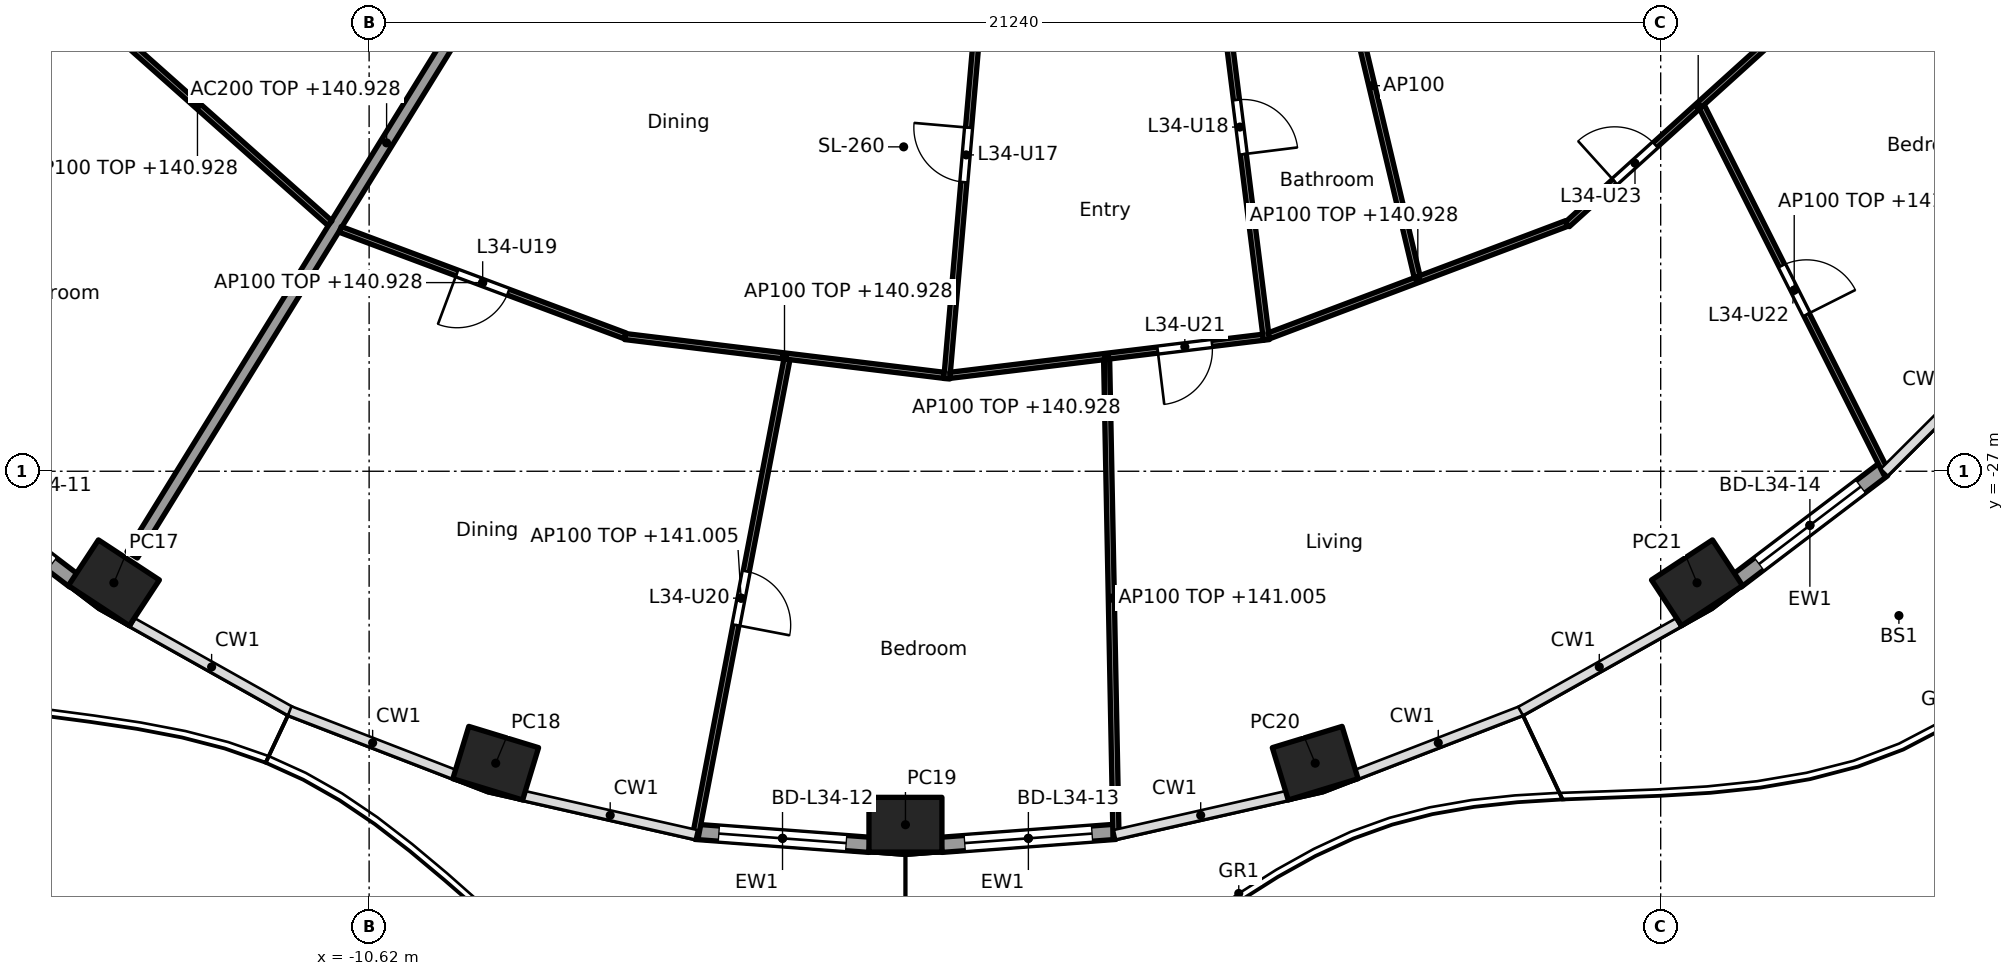
"""IFC4 building model, lengths in metres.
Left out: names, types, materials, properties, quantities, classifications, styles, units other than length and angle.
Written with IfcOpenShell. Run it as: python <this file> out.ifc"""

import sys

from ifc_helpers import new_model, si_unit, direction, frame, frame_2d, origin, origin_2d, place, context, subcontext, project, spatial, rectangle, hollow_rectangle, extrude, element, fill, save


model = new_model("IFC4")
c1 = context("Model", 3, precision=1e-05, world=origin(), true_north=direction((0.0, 1.0)))
c2 = subcontext(c1, "Body", "Model", "MODEL_VIEW")
j1 = project(units=[si_unit("LENGTHUNIT", "METRE"), si_unit("PLANEANGLEUNIT", "RADIAN")], contexts=[c1])
p1 = place(None, origin())
s1 = spatial("IfcSite", under=j1, at=p1, CompositionType="ELEMENT")
p2 = place(p1, origin())
s2 = spatial("IfcBuilding", under=s1, at=p2, CompositionType="ELEMENT")
p3 = place(p2, frame((0.0, 0.0, 138.1)))
s3 = spatial("IfcBuildingStorey", under=s2, at=p3, CompositionType="ELEMENT", Elevation=138.1)
for number, where, z_axis, x_axis in (
    (1, (-14.817, -28.834, 0.0), (0.0, 0.0, 1.0), (0.836, -0.549, 0.0)),
    (2, (-8.538, -31.801, 0.0), (0.0, 0.0, 1.0), (0.957, -0.292, 0.0)),
    (3, (-1.8, -32.813, 0.0), (0.0, 0.0, 1.0), (1.0, 0.0, 0.0)),
    (4, (4.938, -31.801, 0.0), (0.0, 0.0, 1.0), (0.957, 0.292, 0.0)),
    (5, (11.218, -28.834, 0.0), (0.0, 0.0, 1.0), (0.836, 0.549, 0.0)),
):
    element("IfcColumn", number, at=place(p3, frame(where, z_axis=z_axis, x_axis=x_axis)), inside=s3, PredefinedType="COLUMN", context=c2, shape_type="SweptSolid", body=[
        extrude(hollow_rectangle(XDim=1.2, YDim=0.9, WallThickness=0.04, at=origin_2d()), origin(), (0.0, 0.0, 1.0), 3.7),
    ])
p4 = place(p3, frame((-15.469, -28.805, 0.0), z_axis=(0.0, 0.0, 1.0), x_axis=(-0.796022231079, 0.605267385233, 0.0)))
e6 = element("IfcWall", 6, at=p4, inside=s3, PredefinedType="SOLIDWALL", context=c2, shape_type="SweptSolid", body=[
    extrude(rectangle(XDim=3.026, YDim=0.25, at=frame_2d((1.513, 0.0))), origin(), (0.0, 0.0, 1.0), 3.44),
])
p5 = place(p4, frame((0.463, 0.0, 0.0)))
e7 = element("IfcOpeningElement", 7, at=p5, cuts=e6, PredefinedType="OPENING", context=c2, shape_type="SweptSolid", body=[
    extrude(rectangle(XDim=2.1, YDim=2.4, at=frame_2d((1.05, 1.2))), frame((0.0, 0.135, 0.0), z_axis=(0.0, -1.0, 0.0), x_axis=(1.0, 0.0, 0.0)), (0.0, 0.0, 1.0), 0.27),
])
p6 = place(p3, frame((-2.389, -33.143, 0.0), z_axis=(0.0, 0.0, 1.0), x_axis=(-0.997231697044, 0.074356858535, 0.0)))
e8 = element("IfcWall", 8, at=p6, inside=s3, PredefinedType="SOLIDWALL", context=c2, shape_type="SweptSolid", body=[
    extrude(rectangle(XDim=2.873, YDim=0.25, at=frame_2d((1.437, 0.0))), origin(), (0.0, 0.0, 1.0), 3.44),
])
p7 = place(p6, frame((0.386, 0.0, 0.0)))
e9 = element("IfcOpeningElement", 9, at=p7, cuts=e8, PredefinedType="OPENING", context=c2, shape_type="SweptSolid", body=[
    extrude(rectangle(XDim=2.1, YDim=2.4, at=frame_2d((1.05, 1.2))), frame((0.0, 0.135, 0.0), z_axis=(0.0, -1.0, 0.0), x_axis=(1.0, 0.0, 0.0)), (0.0, 0.0, 1.0), 0.27),
])
p8 = place(p3, frame((1.654, -32.93, 0.0), z_axis=(0.0, 0.0, 1.0), x_axis=(-0.997232166829, -0.074350557769, 0.0)))
e10 = element("IfcWall", 10, at=p8, inside=s3, PredefinedType="SOLIDWALL", context=c2, shape_type="SweptSolid", body=[
    extrude(rectangle(XDim=2.873, YDim=0.25, at=frame_2d((1.437, 0.0))), origin(), (0.0, 0.0, 1.0), 3.44),
])
p9 = place(p8, frame((0.386, 0.0, 0.0)))
e11 = element("IfcOpeningElement", 11, at=p9, cuts=e10, PredefinedType="OPENING", context=c2, shape_type="SweptSolid", body=[
    extrude(rectangle(XDim=2.1, YDim=2.4, at=frame_2d((1.05, 1.2))), frame((0.0, 0.135, 0.0), z_axis=(0.0, -1.0, 0.0), x_axis=(1.0, 0.0, 0.0)), (0.0, 0.0, 1.0), 0.27),
])
p10 = place(p3, frame((14.278, -26.973, 0.0), z_axis=(0.0, 0.0, 1.0), x_axis=(-0.796022231079, -0.605267385233, 0.0)))
e12 = element("IfcWall", 12, at=p10, inside=s3, PredefinedType="SOLIDWALL", context=c2, shape_type="SweptSolid", body=[
    extrude(rectangle(XDim=3.026, YDim=0.25, at=frame_2d((1.513, 0.0))), origin(), (0.0, 0.0, 1.0), 3.44),
])
p11 = place(p10, frame((0.463, 0.0, 0.0)))
e13 = element("IfcOpeningElement", 13, at=p11, cuts=e12, PredefinedType="OPENING", context=c2, shape_type="SweptSolid", body=[
    extrude(rectangle(XDim=2.1, YDim=2.4, at=frame_2d((1.05, 1.2))), frame((0.0, 0.135, 0.0), z_axis=(0.0, -1.0, 0.0), x_axis=(1.0, 0.0, 0.0)), (0.0, 0.0, 1.0), 0.27),
])
p12 = place(p3, frame((-6.149, -14.825, 0.0), z_axis=(0.0, 0.0, 1.0), x_axis=(-0.525406383516, -0.85085141603, 0.0)))
e14 = element("IfcWall", 14, at=p12, inside=s3, PredefinedType="PARTITIONING", context=c2, shape_type="SweptSolid", body=[
    extrude(rectangle(XDim=15.925, YDim=0.2, at=frame_2d((7.962, 0.0))), origin(), (0.0, 0.0, 1.0), 2.828),
])
p13 = place(p3, frame((-11.109, -13.951, 0.0), z_axis=(0.0, 0.0, 1.0), x_axis=(-0.668488676691, -0.743722319913, 0.0)))
e15 = element("IfcWall", 15, at=p13, inside=s3, PredefinedType="PARTITIONING", context=c2, shape_type="SweptSolid", body=[
    extrude(rectangle(XDim=13.094, YDim=0.1, at=frame_2d((6.547, 0.0))), origin(), (0.0, 0.0, 1.0), 2.828),
])
p14 = place(p13, frame((9.5, 0.0, 0.0)))
e16 = element("IfcOpeningElement", 16, at=p14, cuts=e15, PredefinedType="OPENING", context=c2, shape_type="SweptSolid", body=[
    extrude(rectangle(XDim=0.9, YDim=2.1, at=frame_2d((0.45, 1.05))), frame((0.0, 0.06, 0.0), z_axis=(0.0, -1.0, 0.0), x_axis=(1.0, 0.0, 0.0)), (0.0, 0.0, 1.0), 0.12),
])
p15 = place(p3, frame((-15.622, -19.046, 0.0), z_axis=(0.0, 0.0, 1.0), x_axis=(0.747342322463, -0.664439201925, 0.0)))
e17 = element("IfcWall", 17, at=p15, inside=s3, PredefinedType="PARTITIONING", context=c2, shape_type="SweptSolid", body=[
    extrude(rectangle(XDim=5.831, YDim=0.1, at=frame_2d((2.916, 0.0))), origin(), (0.0, 0.0, 1.0), 2.828),
])
p16 = place(p3, frame((-11.096, -23.022, 0.0), z_axis=(0.0, 0.0, 1.0), x_axis=(0.936725688471, -0.350064257758, 0.0)))
e18 = element("IfcWall", 18, at=p16, inside=s3, PredefinedType="PARTITIONING", context=c2, shape_type="SweptSolid", body=[
    extrude(rectangle(XDim=5.003, YDim=0.1, at=frame_2d((2.501, 0.0))), origin(), (0.0, 0.0, 1.0), 2.828),
])
p17 = place(p16, frame((2.051, 0.0, 0.0)))
e19 = element("IfcOpeningElement", 19, at=p17, cuts=e18, PredefinedType="OPENING", context=c2, shape_type="SweptSolid", body=[
    extrude(rectangle(XDim=0.9, YDim=2.1, at=frame_2d((0.45, 1.05))), frame((0.0, 0.06, 0.0), z_axis=(0.0, -1.0, 0.0), x_axis=(1.0, 0.0, 0.0)), (0.0, 0.0, 1.0), 0.12),
])
p18 = place(p3, frame((-6.413, -24.784, 0.0), z_axis=(0.0, 0.0, 1.0), x_axis=(0.992690077723, -0.120691381588, 0.0)))
e20 = element("IfcWall", 20, at=p18, inside=s3, PredefinedType="PARTITIONING", context=c2, shape_type="SweptSolid", body=[
    extrude(rectangle(XDim=5.286, YDim=0.1, at=frame_2d((2.643, 0.0))), origin(), (0.0, 0.0, 1.0), 2.828),
])
p19 = place(p3, frame((-3.749, -25.159, 0.0), z_axis=(0.0, 0.0, 1.0), x_axis=(-0.188392334675, -0.982093848996, 0.0)))
e21 = element("IfcWall", 21, at=p19, inside=s3, PredefinedType="PARTITIONING", context=c2, shape_type="SweptSolid", body=[
    extrude(rectangle(XDim=8.0, YDim=0.1, at=frame_2d((4.0, 0.0))), origin(), (0.0, 0.0, 1.0), 2.905),
])
p20 = place(p19, frame((3.55, 0.0, 0.0)))
e22 = element("IfcOpeningElement", 22, at=p20, cuts=e21, PredefinedType="OPENING", context=c2, shape_type="SweptSolid", body=[
    extrude(rectangle(XDim=0.9, YDim=2.1, at=frame_2d((0.45, 1.05))), frame((0.0, 0.06, 0.0), z_axis=(0.0, -1.0, 0.0), x_axis=(1.0, 0.0, 0.0)), (0.0, 0.0, 1.0), 0.12),
])
p21 = place(p3, frame((-0.009, -12.664, 0.0), z_axis=(0.0, 0.0, 1.0), x_axis=(-0.086441225464, -0.996256952066, 0.0)))
e23 = element("IfcWall", 23, at=p21, inside=s3, PredefinedType="PARTITIONING", context=c2, shape_type="SweptSolid", body=[
    extrude(rectangle(XDim=12.862, YDim=0.1, at=frame_2d((6.431, 0.0))), origin(), (0.0, 0.0, 1.0), 2.756),
])
p22 = place(p21, frame((2.312, 0.0, 0.0)))
e24 = element("IfcOpeningElement", 24, at=p22, cuts=e23, PredefinedType="OPENING", context=c2, shape_type="SweptSolid", body=[
    extrude(rectangle(XDim=0.9, YDim=2.1, at=frame_2d((0.45, 1.05))), frame((0.0, 0.06, 0.0), z_axis=(0.0, -1.0, 0.0), x_axis=(1.0, 0.0, 0.0)), (0.0, 0.0, 1.0), 0.12),
])
p23 = place(p21, frame((8.718, 0.0, 0.0)))
e25 = element("IfcOpeningElement", 25, at=p23, cuts=e23, PredefinedType="OPENING", context=c2, shape_type="SweptSolid", body=[
    extrude(rectangle(XDim=0.9, YDim=2.1, at=frame_2d((0.45, 1.05))), frame((0.0, 0.06, 0.0), z_axis=(0.0, -1.0, 0.0), x_axis=(1.0, 0.0, 0.0)), (0.0, 0.0, 1.0), 0.12),
])
p24 = place(p3, frame((-1.066, -25.422, 0.0), z_axis=(0.0, 0.0, 1.0), x_axis=(0.992692993044, 0.120667400577, 0.0)))
e26 = element("IfcWall", 26, at=p24, inside=s3, PredefinedType="PARTITIONING", context=c2, shape_type="SweptSolid", body=[
    extrude(rectangle(XDim=5.186, YDim=0.1, at=frame_2d((2.593, 0.0))), origin(), (0.0, 0.0, 1.0), 2.828),
])
p25 = place(p24, frame((3.439, 0.0, 0.0)))
e27 = element("IfcOpeningElement", 27, at=p25, cuts=e26, PredefinedType="OPENING", context=c2, shape_type="SweptSolid", body=[
    extrude(rectangle(XDim=0.9, YDim=2.1, at=frame_2d((0.45, 1.05))), frame((0.0, 0.06, 0.0), z_axis=(0.0, -1.0, 0.0), x_axis=(1.0, 0.0, 0.0)), (0.0, 0.0, 1.0), 0.12),
])
p26 = place(p3, frame((1.508, -25.159, 0.0), z_axis=(0.0, 0.0, 1.0), x_axis=(0.019670464527, -0.999806517695, 0.0)))
e28 = element("IfcWall", 28, at=p26, inside=s3, PredefinedType="PARTITIONING", context=c2, shape_type="SweptSolid", body=[
    extrude(rectangle(XDim=7.856, YDim=0.1, at=frame_2d((3.928, 0.0))), origin(), (0.0, 0.0, 1.0), 2.905),
])
p27 = place(p3, frame((2.615, -12.664, 0.0), z_axis=(0.0, 0.0, 1.0), x_axis=(0.124051875784, -0.992275733914, 0.0)))
e29 = element("IfcWall", 29, at=p27, inside=s3, PredefinedType="PARTITIONING", context=c2, shape_type="SweptSolid", body=[
    extrude(rectangle(XDim=12.271, YDim=0.1, at=frame_2d((6.135, 0.0))), origin(), (0.0, 0.0, 1.0), 2.756),
])
p28 = place(p27, frame((2.183, 0.0, 0.0)))
e30 = element("IfcOpeningElement", 30, at=p28, cuts=e29, PredefinedType="OPENING", context=c2, shape_type="SweptSolid", body=[
    extrude(rectangle(XDim=0.9, YDim=2.1, at=frame_2d((0.45, 1.05))), frame((0.0, 0.06, 0.0), z_axis=(0.0, -1.0, 0.0), x_axis=(1.0, 0.0, 0.0)), (0.0, 0.0, 1.0), 0.12),
])
p29 = place(p27, frame((8.293, 0.0, 0.0)))
e31 = element("IfcOpeningElement", 31, at=p29, cuts=e29, PredefinedType="OPENING", context=c2, shape_type="SweptSolid", body=[
    extrude(rectangle(XDim=0.9, YDim=2.1, at=frame_2d((0.45, 1.05))), frame((0.0, 0.06, 0.0), z_axis=(0.0, -1.0, 0.0), x_axis=(1.0, 0.0, 0.0)), (0.0, 0.0, 1.0), 0.12),
])
p30 = place(p3, frame((4.178, -24.773, 0.0), z_axis=(0.0, 0.0, 1.0), x_axis=(0.935585145124, 0.353101169955, 0.0)))
e32 = element("IfcWall", 32, at=p30, inside=s3, PredefinedType="PARTITIONING", context=c2, shape_type="SweptSolid", body=[
    extrude(rectangle(XDim=5.233, YDim=0.1, at=frame_2d((2.617, 0.0))), origin(), (0.0, 0.0, 1.0), 2.828),
])
p31 = place(p3, frame((5.125, -17.518, 0.0), z_axis=(0.0, 0.0, 1.0), x_axis=(0.230621848401, -0.973043453829, 0.0)))
e33 = element("IfcWall", 33, at=p31, inside=s3, PredefinedType="PARTITIONING", context=c2, shape_type="SweptSolid", body=[
    extrude(rectangle(XDim=6.457, YDim=0.1, at=frame_2d((3.228, 0.0))), origin(), (0.0, 0.0, 1.0), 3.44),
])
p32 = place(p3, frame((9.084, -22.941, 0.0), z_axis=(0.0, 0.0, 1.0), x_axis=(0.741684187175, 0.670749257543, 0.0)))
e34 = element("IfcWall", 34, at=p32, inside=s3, PredefinedType="PARTITIONING", context=c2, shape_type="SweptSolid", body=[
    extrude(rectangle(XDim=5.806, YDim=0.1, at=frame_2d((2.903, 0.0))), origin(), (0.0, 0.0, 1.0), 2.828),
])
p33 = place(p32, frame((1.052, 0.0, 0.0)))
e35 = element("IfcOpeningElement", 35, at=p33, cuts=e34, PredefinedType="OPENING", context=c2, shape_type="SweptSolid", body=[
    extrude(rectangle(XDim=0.9, YDim=2.1, at=frame_2d((0.45, 1.05))), frame((0.0, 0.06, 0.0), z_axis=(0.0, -1.0, 0.0), x_axis=(1.0, 0.0, 0.0)), (0.0, 0.0, 1.0), 0.12),
])
p34 = place(p3, frame((11.296, -21.005, 0.0), z_axis=(0.0, 0.0, 1.0), x_axis=(0.44991509116, -0.893071335755, 0.0)))
e36 = element("IfcWall", 36, at=p34, inside=s3, PredefinedType="PARTITIONING", context=c2, shape_type="SweptSolid", body=[
    extrude(rectangle(XDim=6.755, YDim=0.1, at=frame_2d((3.377, 0.0))), origin(), (0.0, 0.0, 1.0), 2.905),
])
p35 = place(p34, frame((2.927, 0.0, 0.0)))
e37 = element("IfcOpeningElement", 37, at=p35, cuts=e36, PredefinedType="OPENING", context=c2, shape_type="SweptSolid", body=[
    extrude(rectangle(XDim=0.9, YDim=2.1, at=frame_2d((0.45, 1.05))), frame((0.0, 0.06, 0.0), z_axis=(0.0, -1.0, 0.0), x_axis=(1.0, 0.0, 0.0)), (0.0, 0.0, 1.0), 0.12),
])
p36 = place(p3, frame((11.667, -12.287, 0.0), z_axis=(0.0, 0.0, 1.0), x_axis=(0.635618027424, -0.772003706736, 0.0)))
e38 = element("IfcWall", 38, at=p36, inside=s3, PredefinedType="PARTITIONING", context=c2, shape_type="SweptSolid", body=[
    extrude(rectangle(XDim=11.893, YDim=0.1, at=frame_2d((5.947, 0.0))), origin(), (0.0, 0.0, 1.0), 2.905),
])
p37 = place(p36, frame((2.341, 0.0, 0.0)))
e39 = element("IfcOpeningElement", 39, at=p37, cuts=e38, PredefinedType="OPENING", context=c2, shape_type="SweptSolid", body=[
    extrude(rectangle(XDim=0.9, YDim=2.1, at=frame_2d((0.45, 1.05))), frame((0.0, 0.06, 0.0), z_axis=(0.0, -1.0, 0.0), x_axis=(1.0, 0.0, 0.0)), (0.0, 0.0, 1.0), 0.12),
])
p38 = place(p7, origin())
e40 = element("IfcDoor", 40, at=p38, inside=s3, OperationType="SLIDING_TO_LEFT", PredefinedType="DOOR", context=c2, shape_type="SweptSolid", body=[
    extrude(rectangle(XDim=2.1, YDim=2.4, at=frame_2d((1.05, 1.2))), frame((0.0, 0.025, 0.0), z_axis=(0.0, -1.0, 0.0), x_axis=(1.0, 0.0, 0.0)), (0.0, 0.0, 1.0), 0.05),
])
fill(e9, e40)
p39 = place(p9, origin())
e41 = element("IfcDoor", 41, at=p39, inside=s3, OperationType="SLIDING_TO_LEFT", PredefinedType="DOOR", context=c2, shape_type="SweptSolid", body=[
    extrude(rectangle(XDim=2.1, YDim=2.4, at=frame_2d((1.05, 1.2))), frame((0.0, 0.025, 0.0), z_axis=(0.0, -1.0, 0.0), x_axis=(1.0, 0.0, 0.0)), (0.0, 0.0, 1.0), 0.05),
])
fill(e11, e41)
p40 = place(p11, origin())
e42 = element("IfcDoor", 42, at=p40, inside=s3, OperationType="SLIDING_TO_LEFT", PredefinedType="DOOR", context=c2, shape_type="SweptSolid", body=[
    extrude(rectangle(XDim=2.1, YDim=2.4, at=frame_2d((1.05, 1.2))), frame((0.0, 0.025, 0.0), z_axis=(0.0, -1.0, 0.0), x_axis=(1.0, 0.0, 0.0)), (0.0, 0.0, 1.0), 0.05),
])
fill(e13, e42)
p41 = place(p23, frame((0.9, 0.0, 0.0), x_axis=(-1.0, 0.0, 0.0)))
e43 = element("IfcDoor", 43, at=p41, inside=s3, OperationType="SINGLE_SWING_RIGHT", PredefinedType="DOOR", context=c2, shape_type="SweptSolid", body=[
    extrude(rectangle(XDim=0.9, YDim=2.1, at=frame_2d((0.45, 1.05))), frame((0.0, 0.025, 0.0), z_axis=(0.0, -1.0, 0.0), x_axis=(1.0, 0.0, 0.0)), (0.0, 0.0, 1.0), 0.05),
])
fill(e25, e43)
p42 = place(p29, origin())
e44 = element("IfcDoor", 44, at=p42, inside=s3, OperationType="SINGLE_SWING_RIGHT", PredefinedType="DOOR", context=c2, shape_type="SweptSolid", body=[
    extrude(rectangle(XDim=0.9, YDim=2.1, at=frame_2d((0.45, 1.05))), frame((0.0, 0.025, 0.0), z_axis=(0.0, -1.0, 0.0), x_axis=(1.0, 0.0, 0.0)), (0.0, 0.0, 1.0), 0.05),
])
fill(e31, e44)
p43 = place(p17, frame((0.9, 0.0, 0.0), x_axis=(-1.0, 0.0, 0.0)))
e45 = element("IfcDoor", 45, at=p43, inside=s3, OperationType="SINGLE_SWING_RIGHT", PredefinedType="DOOR", context=c2, shape_type="SweptSolid", body=[
    extrude(rectangle(XDim=0.9, YDim=2.1, at=frame_2d((0.45, 1.05))), frame((0.0, 0.025, 0.0), z_axis=(0.0, -1.0, 0.0), x_axis=(1.0, 0.0, 0.0)), (0.0, 0.0, 1.0), 0.05),
])
fill(e19, e45)
p44 = place(p20, origin())
e46 = element("IfcDoor", 46, at=p44, inside=s3, OperationType="SINGLE_SWING_RIGHT", PredefinedType="DOOR", context=c2, shape_type="SweptSolid", body=[
    extrude(rectangle(XDim=0.9, YDim=2.1, at=frame_2d((0.45, 1.05))), frame((0.0, 0.025, 0.0), z_axis=(0.0, -1.0, 0.0), x_axis=(1.0, 0.0, 0.0)), (0.0, 0.0, 1.0), 0.05),
])
fill(e22, e46)
p45 = place(p25, frame((0.9, 0.0, 0.0), x_axis=(-1.0, 0.0, 0.0)))
e47 = element("IfcDoor", 47, at=p45, inside=s3, OperationType="SINGLE_SWING_RIGHT", PredefinedType="DOOR", context=c2, shape_type="SweptSolid", body=[
    extrude(rectangle(XDim=0.9, YDim=2.1, at=frame_2d((0.45, 1.05))), frame((0.0, 0.025, 0.0), z_axis=(0.0, -1.0, 0.0), x_axis=(1.0, 0.0, 0.0)), (0.0, 0.0, 1.0), 0.05),
])
fill(e27, e47)
p46 = place(p35, origin())
e48 = element("IfcDoor", 48, at=p46, inside=s3, OperationType="SINGLE_SWING_RIGHT", PredefinedType="DOOR", context=c2, shape_type="SweptSolid", body=[
    extrude(rectangle(XDim=0.9, YDim=2.1, at=frame_2d((0.45, 1.05))), frame((0.0, 0.025, 0.0), z_axis=(0.0, -1.0, 0.0), x_axis=(1.0, 0.0, 0.0)), (0.0, 0.0, 1.0), 0.05),
])
fill(e37, e48)
p47 = place(p33, origin())
e49 = element("IfcDoor", 49, at=p47, inside=s3, OperationType="SINGLE_SWING_LEFT", PredefinedType="DOOR", context=c2, shape_type="SweptSolid", body=[
    extrude(rectangle(XDim=0.9, YDim=2.1, at=frame_2d((0.45, 1.05))), frame((0.0, 0.025, 0.0), z_axis=(0.0, -1.0, 0.0), x_axis=(1.0, 0.0, 0.0)), (0.0, 0.0, 1.0), 0.05),
])
fill(e35, e49)
save(model, sys.argv[1])
